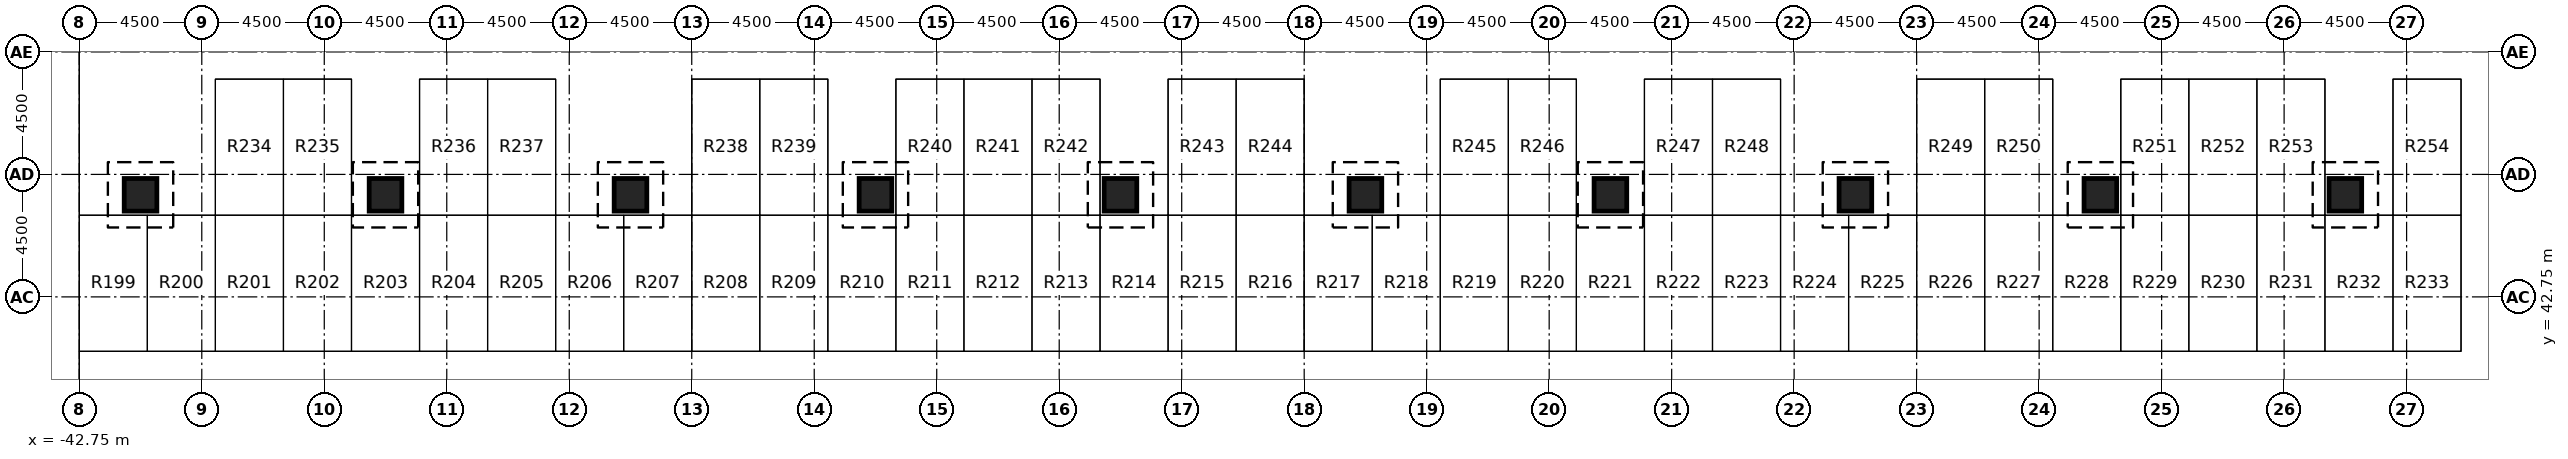
"""IFC4 building model, lengths in metres.
Left out: names, types, materials, properties, quantities, classifications, styles, units other than length and angle.
Written with IfcOpenShell. Run it as: python <this file> out.ifc"""

import sys

from ifc_helpers import new_model, si_unit, direction, frame, origin, origin_2d, place, context, subcontext, project, spatial, rectangle, extrude, element, save


model = new_model("IFC4")
c1 = context("Model", 3, precision=1e-05, world=origin(), true_north=direction((0.0, 1.0)))
c2 = subcontext(c1, "Body", "Model", "MODEL_VIEW")
j1 = project(units=[si_unit("LENGTHUNIT", "METRE"), si_unit("PLANEANGLEUNIT", "RADIAN")], contexts=[c1])
p1 = place(None, origin())
s1 = spatial("IfcSite", under=j1, at=p1, CompositionType="ELEMENT")
p2 = place(p1, origin())
s2 = spatial("IfcBuilding", under=s1, at=p2, CompositionType="ELEMENT")
p3 = place(p2, frame((0.0, 0.0, -8.0)))
s3 = spatial("IfcBuildingStorey", under=s2, at=p3, CompositionType="ELEMENT", Elevation=-8.0)
for number, where, z_axis, x_axis in (
    (1, (-40.5, 46.5, 0.0), (0.0, 0.0, 1.0), (1.0, 0.0, 0.0)),
    (2, (-31.5, 46.5, 0.0), (0.0, 0.0, 1.0), (1.0, 0.0, 0.0)),
    (3, (-22.5, 46.5, 0.0), (0.0, 0.0, 1.0), (1.0, 0.0, 0.0)),
    (4, (-13.5, 46.5, 0.0), (0.0, 0.0, 1.0), (1.0, 0.0, 0.0)),
    (5, (-4.5, 46.5, 0.0), (0.0, 0.0, 1.0), (1.0, 0.0, 0.0)),
    (6, (4.5, 46.5, 0.0), (0.0, 0.0, 1.0), (1.0, 0.0, 0.0)),
    (7, (13.5, 46.5, 0.0), (0.0, 0.0, 1.0), (1.0, 0.0, 0.0)),
    (8, (22.5, 46.5, 0.0), (0.0, 0.0, 1.0), (1.0, 0.0, 0.0)),
    (9, (31.5, 46.5, 0.0), (0.0, 0.0, 1.0), (1.0, 0.0, 0.0)),
    (10, (40.5, 46.5, 0.0), (0.0, 0.0, 1.0), (1.0, 0.0, 0.0)),
):
    element("IfcColumn", number, at=place(p3, frame(where, z_axis=z_axis, x_axis=x_axis)), inside=s3, PredefinedType="COLUMN", context=c2, shape_type="SweptSolid", body=[
        extrude(rectangle(XDim=1.2, YDim=1.2, at=origin_2d()), origin(), (0.0, 0.0, 1.0), 3.4),
    ])
save(model, sys.argv[1])
